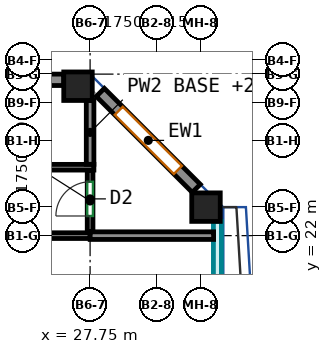
"""IFC4 building model, lengths in metres.
Left out: names, types, materials, properties, quantities, classifications, styles, units other than length and angle.
Written with IfcOpenShell. Run it as: python <this file> out.ifc"""

import sys

from ifc_helpers import new_model, si_unit, direction, frame, frame_2d, origin, origin_2d, place, context, subcontext, project, spatial, rectangle, extrude, source, transform, mapped, element, fill, save


model = new_model("IFC4")
c1 = context("Model", 3, precision=1e-05, world=origin(), true_north=direction((0.0, 1.0)))
c2 = subcontext(c1, "Body", "Model", "MODEL_VIEW")
j1 = project(units=[si_unit("LENGTHUNIT", "METRE"), si_unit("PLANEANGLEUNIT", "RADIAN")], contexts=[c1])
p1 = place(None, origin())
s1 = spatial("IfcSite", under=j1, at=p1, CompositionType="ELEMENT")
p2 = place(p1, origin())
s2 = spatial("IfcBuilding", under=s1, at=p2, CompositionType="ELEMENT")
p3 = place(p2, frame((0.0, 0.0, 220.3)))
s3 = spatial("IfcBuildingStorey", under=s2, at=p3, CompositionType="ELEMENT", Elevation=220.3)
m1 = source(origin(), c2, "Body", "SweptSolid", [
    extrude(rectangle(XDim=0.75, YDim=0.75, at=origin_2d()), origin(), (0.0, 0.0, 1.0), 3.0),
])
for number, where, z_axis, x_axis in (
    (1, (27.432, 25.932, 0.0), (0.0, 0.0, 1.0), (1.0, 0.0, 0.0)),
    (2, (30.8, 22.75, 0.0), (0.0, 0.0, 1.0), (1.0, 0.0, 0.0)),
):
    element("IfcColumn", number, at=place(p3, frame(where, z_axis=z_axis, x_axis=x_axis)), inside=s3, PredefinedType="COLUMN", context=c2, shape_type="MappedRepresentation", body=[
        mapped(m1, transform((0.0, 0.0, 0.0))),
    ])
m2 = source(origin(), c2, "Body", "SweptSolid", [
    extrude(rectangle(XDim=3.571, YDim=0.3, at=frame_2d((1.786, 0.0))), origin(), (0.0, 0.0, 1.0), 3.0),
])
p4 = place(p3, frame((30.544, 23.244, 0.0), z_axis=(0.0, 0.0, 1.0), x_axis=(-0.707140964879, 0.707072595841, 0.0)))
e3 = element("IfcWall", 3, at=p4, inside=s3, PredefinedType="SOLIDWALL", context=c2, shape_type="MappedRepresentation", body=[
    mapped(m2, transform((0.0, 0.0, 0.0))),
])
p5 = place(p4, frame((0.686, 0.0, 0.85)))
e4 = element("IfcOpeningElement", 4, at=p5, cuts=e3, PredefinedType="OPENING", context=c2, shape_type="SweptSolid", body=[
    extrude(rectangle(XDim=2.2, YDim=1.95, at=frame_2d((1.1, 0.975))), frame((0.0, 0.16, 0.0), z_axis=(0.0, -1.0, 0.0), x_axis=(1.0, 0.0, 0.0)), (0.0, 0.0, 1.0), 0.32),
])
m3 = source(origin(), c2, "Body", "SweptSolid", [
    extrude(rectangle(XDim=6.515, YDim=0.3, at=frame_2d((3.258, 0.0))), origin(), (0.0, 0.0, 1.0), 3.0),
])
p6 = place(p3, frame((27.057, 26.1, 0.0), z_axis=(0.0, 0.0, 1.0), x_axis=(-1.0, 0.0, 0.0)))
e5 = element("IfcWall", 5, at=p6, inside=s3, PredefinedType="SOLIDWALL", context=c2, shape_type="MappedRepresentation", body=[
    mapped(m3, transform((0.0, 0.0, 0.0))),
])
p7 = place(p6, frame((0.529, 0.0, 0.85)))
e6 = element("IfcOpeningElement", 6, at=p7, cuts=e5, PredefinedType="OPENING", context=c2, shape_type="SweptSolid", body=[
    extrude(rectangle(XDim=2.2, YDim=1.95, at=frame_2d((1.1, 0.975))), frame((0.0, 0.16, 0.0), z_axis=(0.0, -1.0, 0.0), x_axis=(1.0, 0.0, 0.0)), (0.0, 0.0, 1.0), 0.32),
])
p8 = place(p6, frame((3.786, 0.0, 0.85)))
e7 = element("IfcOpeningElement", 7, at=p8, cuts=e5, PredefinedType="OPENING", context=c2, shape_type="SweptSolid", body=[
    extrude(rectangle(XDim=2.2, YDim=1.95, at=frame_2d((1.1, 0.975))), frame((0.0, 0.16, 0.0), z_axis=(0.0, -1.0, 0.0), x_axis=(1.0, 0.0, 0.0)), (0.0, 0.0, 1.0), 0.32),
])
p9 = place(p3, frame((20.667, 22.0, 0.0), z_axis=(0.0, 0.0, 1.0), x_axis=(1.0, 0.0, 0.0)))
e8 = element("IfcWall", 8, at=p9, inside=s3, PredefinedType="PARTITIONING", context=c2, shape_type="SweptSolid", body=[
    extrude(rectangle(XDim=7.083, YDim=0.15, at=frame_2d((3.542, 0.0))), origin(), (0.0, 0.0, 1.0), 3.0),
])
p10 = place(p9, frame((4.254, 0.0, 0.0)))
e9 = element("IfcOpeningElement", 9, at=p10, cuts=e8, PredefinedType="OPENING", context=c2, shape_type="SweptSolid", body=[
    extrude(rectangle(XDim=1.0, YDim=2.1, at=frame_2d((0.5, 1.05))), frame((0.0, 0.085, 0.0), z_axis=(0.0, -1.0, 0.0), x_axis=(1.0, 0.0, 0.0)), (0.0, 0.0, 1.0), 0.17),
])
p11 = place(p3, frame((27.75, 22.1, 0.0), z_axis=(0.0, 0.0, 1.0), x_axis=(0.0, 1.0, 0.0)))
e10 = element("IfcWall", 10, at=p11, inside=s3, PredefinedType="PARTITIONING", context=c2, shape_type="SweptSolid", body=[
    extrude(rectangle(XDim=1.625, YDim=0.15, at=frame_2d((0.812, 0.0))), origin(), (0.0, 0.0, 1.0), 2.4),
])
p12 = place(p11, frame((0.417, 0.0, 0.0)))
e11 = element("IfcOpeningElement", 11, at=p12, cuts=e10, PredefinedType="OPENING", context=c2, shape_type="SweptSolid", body=[
    extrude(rectangle(XDim=0.9, YDim=2.1, at=frame_2d((0.45, 1.05))), frame((0.0, 0.085, 0.0), z_axis=(0.0, -1.0, 0.0), x_axis=(1.0, 0.0, 0.0)), (0.0, 0.0, 1.0), 0.17),
])
p13 = place(p3, frame((27.85, 23.8, 0.0), z_axis=(0.0, 0.0, 1.0), x_axis=(-1.0, 0.0, 0.0)))
e12 = element("IfcWall", 12, at=p13, inside=s3, PredefinedType="PARTITIONING", context=c2, shape_type="SweptSolid", body=[
    extrude(rectangle(XDim=45.7, YDim=0.15, at=frame_2d((22.85, 0.0))), origin(), (0.0, 0.0, 1.0), 3.0),
])
p14 = place(p13, frame((34.978, 0.0, 0.0)))
e13 = element("IfcOpeningElement", 13, at=p14, cuts=e12, PredefinedType="OPENING", context=c2, shape_type="SweptSolid", body=[
    extrude(rectangle(XDim=0.9, YDim=2.1, at=frame_2d((0.45, 1.05))), frame((0.0, 0.085, 0.0), z_axis=(0.0, -1.0, 0.0), x_axis=(1.0, 0.0, 0.0)), (0.0, 0.0, 1.0), 0.17),
])
p15 = place(p3, frame((27.752, 22.0, 0.0), z_axis=(0.0, 0.0, 1.0), x_axis=(1.0, 0.0, 0.0)))
e14 = element("IfcWall", 14, at=p15, inside=s3, PredefinedType="PARTITIONING", context=c2, shape_type="SweptSolid", body=[
    extrude(rectangle(XDim=3.248, YDim=0.2, at=frame_2d((1.624, 0.0))), origin(), (0.0, 0.0, 1.0), 3.0),
])
p16 = place(p3, frame((27.75, 25.557, 0.0), z_axis=(0.0, 0.0, 1.0), x_axis=(0.0, -1.0, 0.0)))
e15 = element("IfcWall", 15, at=p16, inside=s3, PredefinedType="PARTITIONING", context=c2, shape_type="SweptSolid", body=[
    extrude(rectangle(XDim=1.68, YDim=0.2, at=frame_2d((0.84, 0.0))), origin(), (0.0, 0.0, 1.0), 2.4),
])
p17 = place(p5, origin())
e16 = element("IfcWindow", 16, at=p17, inside=s3, PartitioningType="SINGLE_PANEL", PredefinedType="WINDOW", context=c2, shape_type="SweptSolid", body=[
    extrude(rectangle(XDim=2.2, YDim=1.95, at=frame_2d((1.1, 0.975))), frame((0.0, 0.03, 0.0), z_axis=(0.0, -1.0, 0.0), x_axis=(1.0, 0.0, 0.0)), (0.0, 0.0, 1.0), 0.06),
])
fill(e4, e16)
p18 = place(p12, origin())
e17 = element("IfcDoor", 17, at=p18, inside=s3, OperationType="SINGLE_SWING_LEFT", PredefinedType="DOOR", context=c2, shape_type="SweptSolid", body=[
    extrude(rectangle(XDim=0.9, YDim=2.1, at=frame_2d((0.45, 1.05))), frame((0.0, 0.025, 0.0), z_axis=(0.0, -1.0, 0.0), x_axis=(1.0, 0.0, 0.0)), (0.0, 0.0, 1.0), 0.05),
])
fill(e11, e17)
save(model, sys.argv[1])
